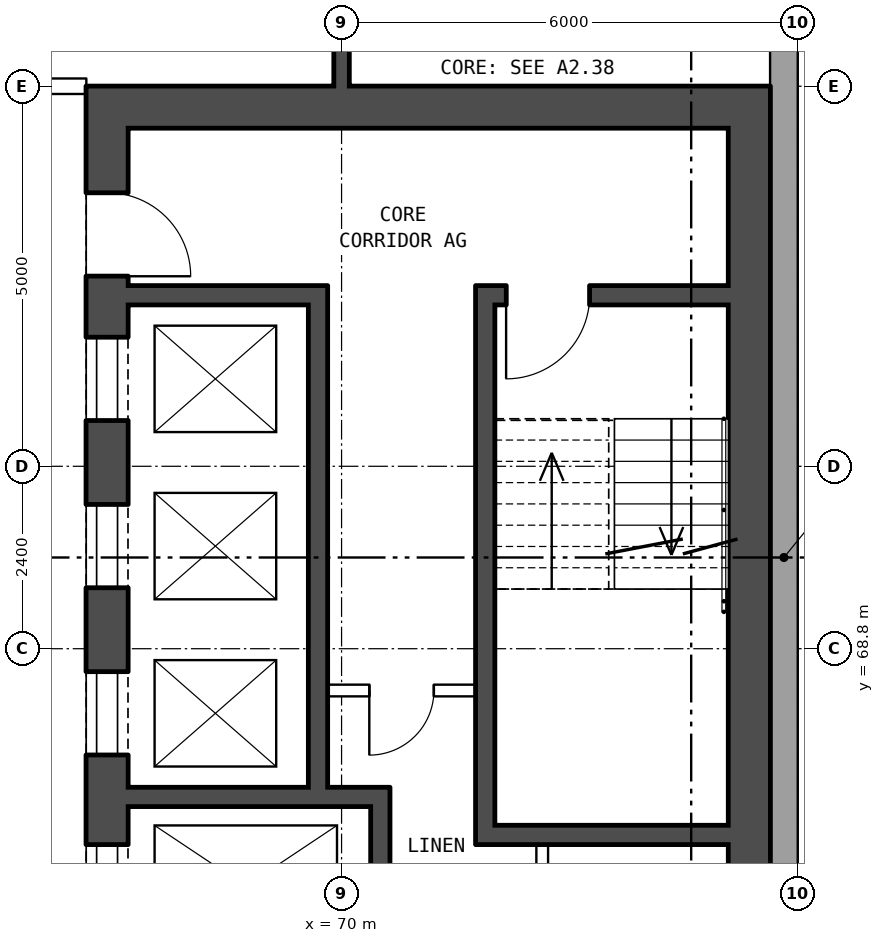
"""IFC4 building model, lengths in metres.
Left out: names, types, materials, properties, quantities, classifications, styles, units other than length and angle.
Written with IfcOpenShell. Run it as: python <this file> out.ifc"""

import sys

from ifc_helpers import new_model, si_unit, direction, frame, frame_2d, origin, place, context, subcontext, project, spatial, rectangle, extrude, element, fill, save


model = new_model("IFC4")
c1 = context("Model", 3, precision=1e-05, world=origin(), true_north=direction((0.0, 1.0)))
c2 = subcontext(c1, "Body", "Model", "MODEL_VIEW")
j1 = project(units=[si_unit("LENGTHUNIT", "METRE"), si_unit("PLANEANGLEUNIT", "RADIAN")], contexts=[c1])
p1 = place(None, origin())
s1 = spatial("IfcSite", under=j1, at=p1, CompositionType="ELEMENT")
p2 = place(p1, origin())
s2 = spatial("IfcBuilding", under=s1, at=p2, CompositionType="ELEMENT")
p3 = place(p2, frame((0.0, 0.0, 133.0)))
s3 = spatial("IfcBuildingStorey", under=s2, at=p3, CompositionType="ELEMENT", Elevation=133.0)
p4 = place(p3, frame((75.82, 57.075, 0.0), z_axis=(0.0, 0.0, 1.0), x_axis=(0.0, 1.0, 0.0)))
e1 = element("IfcWall", 1, at=p4, inside=s3, PredefinedType="STANDARD", context=c2, shape_type="SweptSolid", body=[
    extrude(rectangle(XDim=25.851, YDim=0.36, at=frame_2d((12.925, 0.0))), origin(), (0.0, 0.0, 1.0), 2.85),
])
p5 = place(p4, frame((1.625, 0.0, 0.8)))
e2 = element("IfcOpeningElement", 2, at=p5, cuts=e1, PredefinedType="OPENING", context=c2, shape_type="SweptSolid", body=[
    extrude(rectangle(XDim=1.6, YDim=1.8, at=frame_2d((0.8, 0.9))), frame((0.0, 0.19, 0.0), z_axis=(0.0, -1.0, 0.0), x_axis=(1.0, 0.0, 0.0)), (0.0, 0.0, 1.0), 0.38),
])
p6 = place(p4, frame((4.625, 0.0, 0.8)))
e3 = element("IfcOpeningElement", 3, at=p6, cuts=e1, PredefinedType="OPENING", context=c2, shape_type="SweptSolid", body=[
    extrude(rectangle(XDim=1.6, YDim=1.8, at=frame_2d((0.8, 0.9))), frame((0.0, 0.19, 0.0), z_axis=(0.0, -1.0, 0.0), x_axis=(1.0, 0.0, 0.0)), (0.0, 0.0, 1.0), 0.38),
])
p7 = place(p4, frame((19.625, 0.0, 0.8)))
e4 = element("IfcOpeningElement", 4, at=p7, cuts=e1, PredefinedType="OPENING", context=c2, shape_type="SweptSolid", body=[
    extrude(rectangle(XDim=1.6, YDim=1.8, at=frame_2d((0.8, 0.9))), frame((0.0, 0.19, 0.0), z_axis=(0.0, -1.0, 0.0), x_axis=(1.0, 0.0, 0.0)), (0.0, 0.0, 1.0), 0.38),
])
p8 = place(p4, frame((22.625, 0.0, 0.8)))
e5 = element("IfcOpeningElement", 5, at=p8, cuts=e1, PredefinedType="OPENING", context=c2, shape_type="SweptSolid", body=[
    extrude(rectangle(XDim=1.6, YDim=1.8, at=frame_2d((0.8, 0.9))), frame((0.0, 0.19, 0.0), z_axis=(0.0, -1.0, 0.0), x_axis=(1.0, 0.0, 0.0)), (0.0, 0.0, 1.0), 0.38),
])
p9 = place(p3, frame((66.915, 63.8, 0.0), z_axis=(0.0, 0.0, 1.0), x_axis=(0.0, 1.0, 0.0)))
e6 = element("IfcWall", 6, at=p9, inside=s3, PredefinedType="SHEAR", context=c2, shape_type="SweptSolid", body=[
    extrude(rectangle(XDim=12.4, YDim=0.55, at=frame_2d((6.2, 0.0))), origin(), (0.0, 0.0, 1.0), 2.85),
])
p10 = place(p9, frame((1.325, 0.0, 0.0)))
e7 = element("IfcOpeningElement", 7, at=p10, cuts=e6, PredefinedType="OPENING", context=c2, shape_type="SweptSolid", body=[
    extrude(rectangle(XDim=1.1, YDim=2.1, at=frame_2d((0.55, 1.05))), frame((0.0, 0.285, 0.0), z_axis=(0.0, -1.0, 0.0), x_axis=(1.0, 0.0, 0.0)), (0.0, 0.0, 1.0), 0.57),
])
p11 = place(p9, frame((3.6, 0.0, 0.0)))
e8 = element("IfcOpeningElement", 8, at=p11, cuts=e6, PredefinedType="OPENING", context=c2, shape_type="SweptSolid", body=[
    extrude(rectangle(XDim=1.1, YDim=2.1, at=frame_2d((0.55, 1.05))), frame((0.0, 0.285, 0.0), z_axis=(0.0, -1.0, 0.0), x_axis=(1.0, 0.0, 0.0)), (0.0, 0.0, 1.0), 0.57),
])
p12 = place(p9, frame((5.8, 0.0, 0.0)))
e9 = element("IfcOpeningElement", 9, at=p12, cuts=e6, PredefinedType="OPENING", context=c2, shape_type="SweptSolid", body=[
    extrude(rectangle(XDim=1.1, YDim=2.1, at=frame_2d((0.55, 1.05))), frame((0.0, 0.285, 0.0), z_axis=(0.0, -1.0, 0.0), x_axis=(1.0, 0.0, 0.0)), (0.0, 0.0, 1.0), 0.57),
])
p13 = place(p9, frame((8.0, 0.0, 0.0)))
e10 = element("IfcOpeningElement", 10, at=p13, cuts=e6, PredefinedType="OPENING", context=c2, shape_type="SweptSolid", body=[
    extrude(rectangle(XDim=1.1, YDim=2.1, at=frame_2d((0.55, 1.05))), frame((0.0, 0.285, 0.0), z_axis=(0.0, -1.0, 0.0), x_axis=(1.0, 0.0, 0.0)), (0.0, 0.0, 1.0), 0.57),
])
p14 = place(p9, frame((9.9, 0.0, 0.0)))
e11 = element("IfcOpeningElement", 11, at=p14, cuts=e6, PredefinedType="OPENING", context=c2, shape_type="SweptSolid", body=[
    extrude(rectangle(XDim=1.1, YDim=2.1, at=frame_2d((0.55, 1.05))), frame((0.0, 0.285, 0.0), z_axis=(0.0, -1.0, 0.0), x_axis=(1.0, 0.0, 0.0)), (0.0, 0.0, 1.0), 0.57),
])
p15 = place(p3, frame((75.365, 63.8, 0.0), z_axis=(0.0, 0.0, 1.0), x_axis=(0.0, 1.0, 0.0)))
e12 = element("IfcWall", 12, at=p15, inside=s3, PredefinedType="SHEAR", context=c2, shape_type="SweptSolid", body=[
    extrude(rectangle(XDim=12.4, YDim=0.55, at=frame_2d((6.2, 0.0))), origin(), (0.0, 0.0, 1.0), 2.85),
])
p16 = place(p3, frame((67.19, 75.925, 0.0), z_axis=(0.0, 0.0, 1.0), x_axis=(1.0, 0.0, 0.0)))
e13 = element("IfcWall", 13, at=p16, inside=s3, PredefinedType="SHEAR", context=c2, shape_type="SweptSolid", body=[
    extrude(rectangle(XDim=7.9, YDim=0.55, at=frame_2d((3.95, 0.0))), origin(), (0.0, 0.0, 1.0), 2.85),
])
p17 = place(p3, frame((72.015, 66.35, 0.0), z_axis=(0.0, 0.0, 1.0), x_axis=(1.0, 0.0, 0.0)))
e14 = element("IfcWall", 14, at=p17, inside=s3, PredefinedType="SHEAR", context=c2, shape_type="SweptSolid", body=[
    extrude(rectangle(XDim=3.075, YDim=0.25, at=frame_2d((1.538, 0.0))), origin(), (0.0, 0.0, 1.0), 2.85),
])
p18 = place(p3, frame((67.19, 66.85, 0.0), z_axis=(0.0, 0.0, 1.0), x_axis=(1.0, 0.0, 0.0)))
e15 = element("IfcWall", 15, at=p18, inside=s3, PredefinedType="SHEAR", context=c2, shape_type="SweptSolid", body=[
    extrude(rectangle(XDim=3.445, YDim=0.25, at=frame_2d((1.723, 0.0))), origin(), (0.0, 0.0, 1.0), 2.85),
])
p19 = place(p3, frame((69.815, 68.25, 0.0), z_axis=(0.0, 0.0, 1.0), x_axis=(1.0, 0.0, 0.0)))
e16 = element("IfcWall", 16, at=p19, inside=s3, PredefinedType="PARTITIONING", context=c2, shape_type="SweptSolid", body=[
    extrude(rectangle(XDim=1.95, YDim=0.15, at=frame_2d((0.975, 0.0))), origin(), (0.0, 0.0, 1.0), 2.85),
])
p20 = place(p19, frame((0.55, 0.0, 0.0)))
e17 = element("IfcOpeningElement", 17, at=p20, cuts=e16, PredefinedType="OPENING", context=c2, shape_type="SweptSolid", body=[
    extrude(rectangle(XDim=0.85, YDim=2.1, at=frame_2d((0.425, 1.05))), frame((0.0, 0.085, 0.0), z_axis=(0.0, -1.0, 0.0), x_axis=(1.0, 0.0, 0.0)), (0.0, 0.0, 1.0), 0.17),
])
p21 = place(p3, frame((67.19, 73.45, 0.0), z_axis=(0.0, 0.0, 1.0), x_axis=(1.0, 0.0, 0.0)))
e18 = element("IfcWall", 18, at=p21, inside=s3, PredefinedType="SHEAR", context=c2, shape_type="SweptSolid", body=[
    extrude(rectangle(XDim=2.375, YDim=0.25, at=frame_2d((1.188, 0.0))), origin(), (0.0, 0.0, 1.0), 2.85),
])
p22 = place(p3, frame((72.015, 73.45, 0.0), z_axis=(0.0, 0.0, 1.0), x_axis=(1.0, 0.0, 0.0)))
e19 = element("IfcWall", 19, at=p22, inside=s3, PredefinedType="SHEAR", context=c2, shape_type="SweptSolid", body=[
    extrude(rectangle(XDim=3.075, YDim=0.25, at=frame_2d((1.538, 0.0))), origin(), (0.0, 0.0, 1.0), 2.85),
])
p23 = place(p22, frame((0.15, 0.0, 0.0)))
e20 = element("IfcOpeningElement", 20, at=p23, cuts=e19, PredefinedType="OPENING", context=c2, shape_type="SweptSolid", body=[
    extrude(rectangle(XDim=1.1, YDim=2.1, at=frame_2d((0.55, 1.05))), frame((0.0, 0.135, 0.0), z_axis=(0.0, -1.0, 0.0), x_axis=(1.0, 0.0, 0.0)), (0.0, 0.0, 1.0), 0.27),
])
p24 = place(p3, frame((69.69, 66.975, 0.0), z_axis=(0.0, 0.0, 1.0), x_axis=(0.0, 1.0, 0.0)))
e21 = element("IfcWall", 21, at=p24, inside=s3, PredefinedType="SHEAR", context=c2, shape_type="SweptSolid", body=[
    extrude(rectangle(XDim=6.6, YDim=0.25, at=frame_2d((3.3, 0.0))), origin(), (0.0, 0.0, 1.0), 2.85),
])
p25 = place(p3, frame((70.51, 64.35, 0.0), z_axis=(0.0, 0.0, 1.0), x_axis=(0.0, 1.0, 0.0)))
e22 = element("IfcWall", 22, at=p25, inside=s3, PredefinedType="SHEAR", context=c2, shape_type="SweptSolid", body=[
    extrude(rectangle(XDim=2.375, YDim=0.25, at=frame_2d((1.188, 0.0))), origin(), (0.0, 0.0, 1.0), 2.85),
])
p26 = place(p3, frame((71.89, 66.225, 0.0), z_axis=(0.0, 0.0, 1.0), x_axis=(0.0, 1.0, 0.0)))
e23 = element("IfcWall", 23, at=p26, inside=s3, PredefinedType="SHEAR", context=c2, shape_type="SweptSolid", body=[
    extrude(rectangle(XDim=7.35, YDim=0.25, at=frame_2d((3.675, 0.0))), origin(), (0.0, 0.0, 1.0), 2.85),
])
p27 = place(p3, frame((72.64, 64.35, 0.0), z_axis=(0.0, 0.0, 1.0), x_axis=(0.0, 1.0, 0.0)))
e24 = element("IfcWall", 24, at=p27, inside=s3, PredefinedType="PARTITIONING", context=c2, shape_type="SweptSolid", body=[
    extrude(rectangle(XDim=1.875, YDim=0.15, at=frame_2d((0.938, 0.0))), origin(), (0.0, 0.0, 1.0), 2.85),
])
p28 = place(p27, frame((0.512, 0.0, 0.0)))
e25 = element("IfcOpeningElement", 25, at=p28, cuts=e24, PredefinedType="OPENING", context=c2, shape_type="SweptSolid", body=[
    extrude(rectangle(XDim=0.85, YDim=2.1, at=frame_2d((0.425, 1.05))), frame((0.0, 0.085, 0.0), z_axis=(0.0, -1.0, 0.0), x_axis=(1.0, 0.0, 0.0)), (0.0, 0.0, 1.0), 0.17),
])
p29 = place(p3, frame((63.64, 76.2, 0.0), z_axis=(0.0, 0.0, 1.0), x_axis=(1.0, 0.0, 0.0)))
e26 = element("IfcWall", 26, at=p29, inside=s3, PredefinedType="PARTITIONING", context=c2, shape_type="SweptSolid", body=[
    extrude(rectangle(XDim=3.0, YDim=0.2, at=frame_2d((1.5, 0.0))), origin(), (0.0, 0.0, 1.0), 2.85),
])
p30 = place(p29, frame((1.18, 0.0, 0.0)))
e27 = element("IfcOpeningElement", 27, at=p30, cuts=e26, PredefinedType="OPENING", context=c2, shape_type="SweptSolid", body=[
    extrude(rectangle(XDim=1.0, YDim=2.1, at=frame_2d((0.5, 1.05))), frame((0.0, 0.11, 0.0), z_axis=(0.0, -1.0, 0.0), x_axis=(1.0, 0.0, 0.0)), (0.0, 0.0, 1.0), 0.22),
])
p31 = place(p3, frame((70.0, 76.2, 0.0), z_axis=(0.0, 0.0, 1.0), x_axis=(0.0, 1.0, 0.0)))
e28 = element("IfcWall", 28, at=p31, inside=s3, PredefinedType="SOLIDWALL", context=c2, shape_type="SweptSolid", body=[
    extrude(rectangle(XDim=9.44, YDim=0.2, at=frame_2d((4.72, 0.0))), origin(), (0.0, 0.0, 1.0), 2.85),
])
p32 = place(p31, frame((6.22, 0.0, 0.0)))
e29 = element("IfcOpeningElement", 29, at=p32, cuts=e28, PredefinedType="OPENING", context=c2, shape_type="SweptSolid", body=[
    extrude(rectangle(XDim=0.9, YDim=2.1, at=frame_2d((0.45, 1.05))), frame((0.0, 0.11, 0.0), z_axis=(0.0, -1.0, 0.0), x_axis=(1.0, 0.0, 0.0)), (0.0, 0.0, 1.0), 0.22),
])
p33 = place(p31, frame((0.95, 0.0, 0.0)))
e30 = element("IfcOpeningElement", 30, at=p33, cuts=e28, PredefinedType="OPENING", context=c2, shape_type="SweptSolid", body=[
    extrude(rectangle(XDim=0.9, YDim=2.1, at=frame_2d((0.45, 1.05))), frame((0.0, 0.11, 0.0), z_axis=(0.0, -1.0, 0.0), x_axis=(1.0, 0.0, 0.0)), (0.0, 0.0, 1.0), 0.22),
])
p34 = place(p10, origin())
e31 = element("IfcDoor", 31, at=p34, inside=s3, OperationType="DOUBLE_DOOR_SLIDING", PredefinedType="DOOR", context=c2, shape_type="SweptSolid", body=[
    extrude(rectangle(XDim=1.1, YDim=2.1, at=frame_2d((0.55, 1.05))), frame((0.0, -0.21, 0.0), z_axis=(0.0, -1.0, 0.0), x_axis=(1.0, 0.0, 0.0)), (0.0, 0.0, 1.0), 0.05),
])
fill(e7, e31)
p35 = place(p11, origin())
e32 = element("IfcDoor", 32, at=p35, inside=s3, OperationType="DOUBLE_DOOR_SLIDING", PredefinedType="DOOR", context=c2, shape_type="SweptSolid", body=[
    extrude(rectangle(XDim=1.1, YDim=2.1, at=frame_2d((0.55, 1.05))), frame((0.0, -0.21, 0.0), z_axis=(0.0, -1.0, 0.0), x_axis=(1.0, 0.0, 0.0)), (0.0, 0.0, 1.0), 0.05),
])
fill(e8, e32)
p36 = place(p12, origin())
e33 = element("IfcDoor", 33, at=p36, inside=s3, OperationType="DOUBLE_DOOR_SLIDING", PredefinedType="DOOR", context=c2, shape_type="SweptSolid", body=[
    extrude(rectangle(XDim=1.1, YDim=2.1, at=frame_2d((0.55, 1.05))), frame((0.0, -0.21, 0.0), z_axis=(0.0, -1.0, 0.0), x_axis=(1.0, 0.0, 0.0)), (0.0, 0.0, 1.0), 0.05),
])
fill(e9, e33)
p37 = place(p13, origin())
e34 = element("IfcDoor", 34, at=p37, inside=s3, OperationType="DOUBLE_DOOR_SLIDING", PredefinedType="DOOR", context=c2, shape_type="SweptSolid", body=[
    extrude(rectangle(XDim=1.1, YDim=2.1, at=frame_2d((0.55, 1.05))), frame((0.0, -0.21, 0.0), z_axis=(0.0, -1.0, 0.0), x_axis=(1.0, 0.0, 0.0)), (0.0, 0.0, 1.0), 0.05),
])
fill(e10, e34)
p38 = place(p14, frame((1.1, 0.0, 0.0), z_axis=(0.0, 0.0, 1.0), x_axis=(-1.0, 0.0, 0.0)))
e35 = element("IfcDoor", 35, at=p38, inside=s3, OperationType="SINGLE_SWING_RIGHT", PredefinedType="DOOR", context=c2, shape_type="SweptSolid", body=[
    extrude(rectangle(XDim=1.1, YDim=2.1, at=frame_2d((0.55, 1.05))), frame((0.0, 0.26, 0.0), z_axis=(0.0, -1.0, 0.0), x_axis=(1.0, 0.0, 0.0)), (0.0, 0.0, 1.0), 0.05),
])
fill(e11, e35)
p39 = place(p23, frame((1.1, 0.0, 0.0), z_axis=(0.0, 0.0, 1.0), x_axis=(-1.0, 0.0, 0.0)))
e36 = element("IfcDoor", 36, at=p39, inside=s3, OperationType="SINGLE_SWING_RIGHT", PredefinedType="DOOR", context=c2, shape_type="SweptSolid", body=[
    extrude(rectangle(XDim=1.1, YDim=2.1, at=frame_2d((0.55, 1.05))), frame((0.0, 0.025, 0.0), z_axis=(0.0, -1.0, 0.0), x_axis=(1.0, 0.0, 0.0)), (0.0, 0.0, 1.0), 0.05),
])
fill(e20, e36)
p40 = place(p20, frame((0.85, 0.0, 0.0), z_axis=(0.0, 0.0, 1.0), x_axis=(-1.0, 0.0, 0.0)))
e37 = element("IfcDoor", 37, at=p40, inside=s3, OperationType="SINGLE_SWING_RIGHT", PredefinedType="DOOR", context=c2, shape_type="SweptSolid", body=[
    extrude(rectangle(XDim=0.85, YDim=2.1, at=frame_2d((0.425, 1.05))), frame((0.0, 0.025, 0.0), z_axis=(0.0, -1.0, 0.0), x_axis=(1.0, 0.0, 0.0)), (0.0, 0.0, 1.0), 0.05),
])
fill(e17, e37)
save(model, sys.argv[1])
